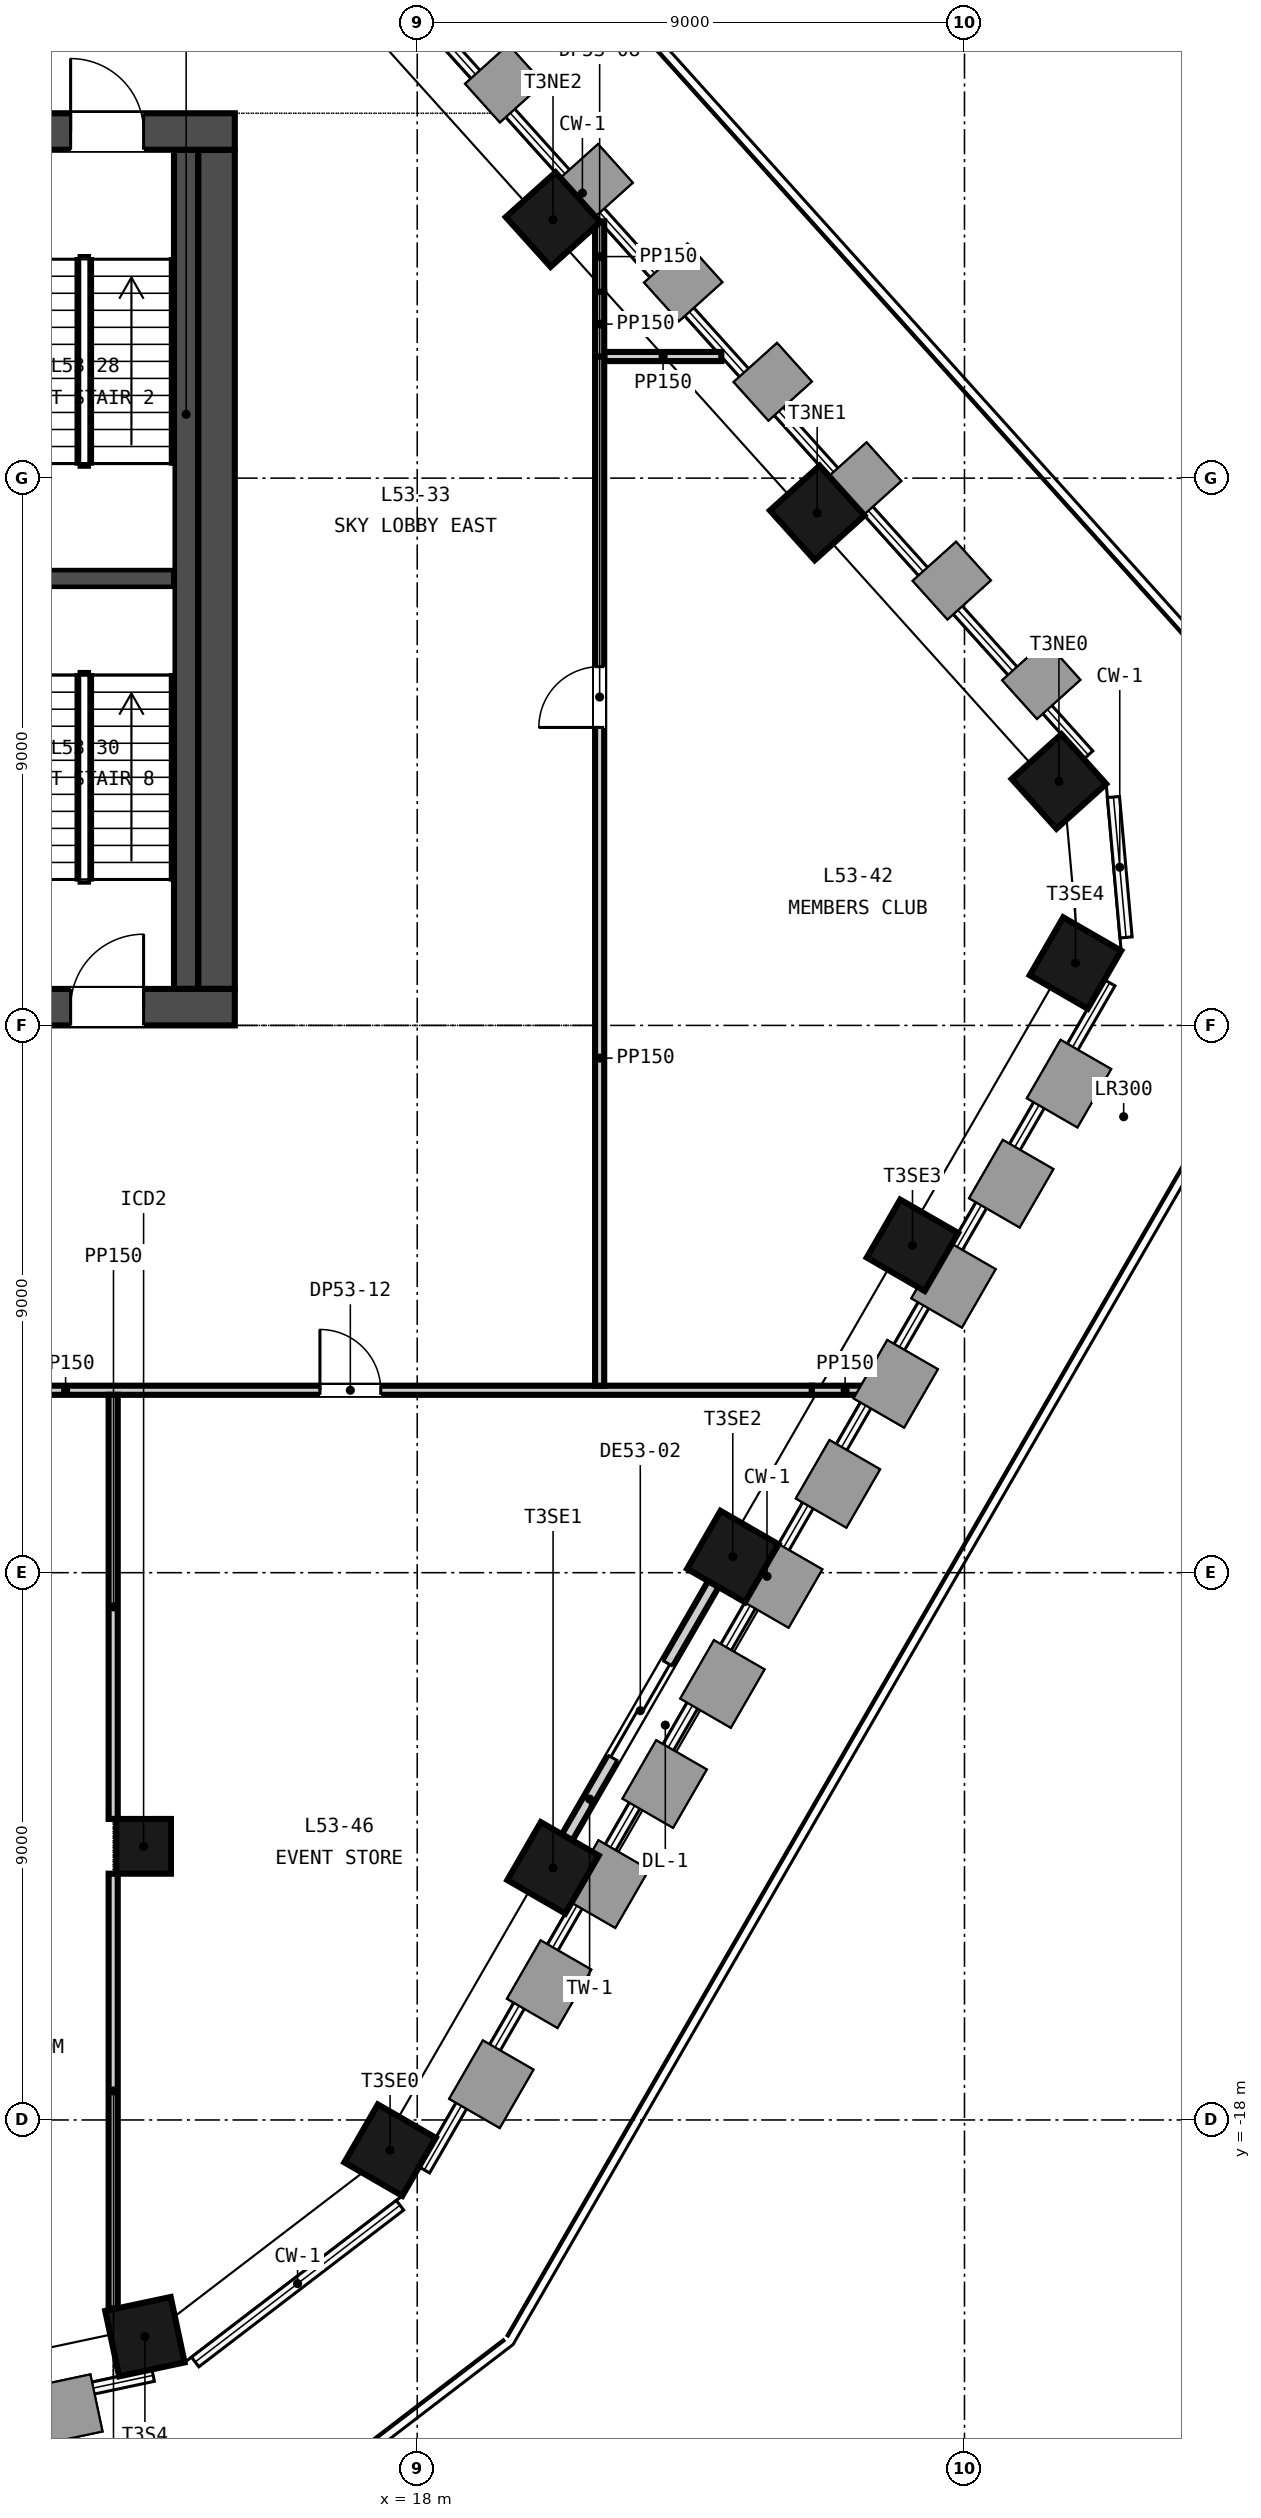
"""IFC4 building model, lengths in metres.
Left out: names, types, materials, properties, quantities, classifications, styles, units other than length and angle.
Written with IfcOpenShell. Run it as: python <this file> out.ifc"""

import sys

from ifc_helpers import new_model, si_unit, direction, frame, frame_2d, origin, origin_2d, place, context, subcontext, project, spatial, rectangle, extrude, element, fill, save


model = new_model("IFC4")
c1 = context("Model", 3, precision=1e-05, world=origin(), true_north=direction((0.0, 1.0)))
c2 = subcontext(c1, "Body", "Model", "MODEL_VIEW")
j1 = project(units=[si_unit("LENGTHUNIT", "METRE"), si_unit("PLANEANGLEUNIT", "RADIAN")], contexts=[c1])
p1 = place(None, origin())
s1 = spatial("IfcSite", under=j1, at=p1, CompositionType="ELEMENT")
p2 = place(p1, origin())
s2 = spatial("IfcBuilding", under=s1, at=p2, CompositionType="ELEMENT")
p3 = place(p2, frame((0.0, 0.0, 211.8)))
s3 = spatial("IfcBuildingStorey", under=s2, at=p3, CompositionType="ELEMENT", Elevation=211.8)
p4 = place(p3, frame((-15.0, 0.3, -0.3), z_axis=(0.0, 0.0, 1.0), x_axis=(1.0, 0.0, 0.0)))
e1 = element("IfcWall", 1, at=p4, inside=s3, PredefinedType="SOLIDWALL", context=c2, shape_type="SweptSolid", body=[
    extrude(rectangle(XDim=30.0, YDim=0.6, at=frame_2d((15.0, 0.0))), origin(), (0.0, 0.0, 1.0), 4.65),
])
p5 = place(p4, frame((5.8, 0.0, 0.3)))
e2 = element("IfcOpeningElement", 2, at=p5, cuts=e1, PredefinedType="OPENING", context=c2, shape_type="SweptSolid", body=[
    extrude(rectangle(XDim=2.4, YDim=2.4, at=frame_2d((1.2, 1.2))), frame((0.0, 0.31, 0.0), z_axis=(0.0, -1.0, 0.0), x_axis=(1.0, 0.0, 0.0)), (0.0, 0.0, 1.0), 0.62),
])
p6 = place(p4, frame((13.8, 0.0, 0.3)))
e3 = element("IfcOpeningElement", 3, at=p6, cuts=e1, PredefinedType="OPENING", context=c2, shape_type="SweptSolid", body=[
    extrude(rectangle(XDim=2.4, YDim=2.4, at=frame_2d((1.2, 1.2))), frame((0.0, 0.31, 0.0), z_axis=(0.0, -1.0, 0.0), x_axis=(1.0, 0.0, 0.0)), (0.0, 0.0, 1.0), 0.62),
])
p7 = place(p4, frame((21.8, 0.0, 0.3)))
e4 = element("IfcOpeningElement", 4, at=p7, cuts=e1, PredefinedType="OPENING", context=c2, shape_type="SweptSolid", body=[
    extrude(rectangle(XDim=2.4, YDim=2.4, at=frame_2d((1.2, 1.2))), frame((0.0, 0.31, 0.0), z_axis=(0.0, -1.0, 0.0), x_axis=(1.0, 0.0, 0.0)), (0.0, 0.0, 1.0), 0.62),
])
p8 = place(p4, frame((1.5, 0.0, 0.3)))
e5 = element("IfcOpeningElement", 5, at=p8, cuts=e1, PredefinedType="OPENING", context=c2, shape_type="SweptSolid", body=[
    extrude(rectangle(XDim=1.2, YDim=2.1, at=frame_2d((0.6, 1.05))), frame((0.0, 0.31, 0.0), z_axis=(0.0, -1.0, 0.0), x_axis=(1.0, 0.0, 0.0)), (0.0, 0.0, 1.0), 0.62),
])
p9 = place(p4, frame((27.3, 0.0, 0.3)))
e6 = element("IfcOpeningElement", 6, at=p9, cuts=e1, PredefinedType="OPENING", context=c2, shape_type="SweptSolid", body=[
    extrude(rectangle(XDim=1.2, YDim=2.1, at=frame_2d((0.6, 1.05))), frame((0.0, 0.31, 0.0), z_axis=(0.0, -1.0, 0.0), x_axis=(1.0, 0.0, 0.0)), (0.0, 0.0, 1.0), 0.62),
])
p10 = place(p3, frame((-15.0, 14.7, -0.3), z_axis=(0.0, 0.0, 1.0), x_axis=(1.0, 0.0, 0.0)))
e7 = element("IfcWall", 7, at=p10, inside=s3, PredefinedType="SOLIDWALL", context=c2, shape_type="SweptSolid", body=[
    extrude(rectangle(XDim=30.0, YDim=0.6, at=frame_2d((15.0, 0.0))), origin(), (0.0, 0.0, 1.0), 4.65),
])
p11 = place(p10, frame((9.25, 0.0, 0.3)))
e8 = element("IfcOpeningElement", 8, at=p11, cuts=e7, PredefinedType="OPENING", context=c2, shape_type="SweptSolid", body=[
    extrude(rectangle(XDim=1.5, YDim=2.1, at=frame_2d((0.75, 1.05))), frame((0.0, 0.31, 0.0), z_axis=(0.0, -1.0, 0.0), x_axis=(1.0, 0.0, 0.0)), (0.0, 0.0, 1.0), 0.62),
])
p12 = place(p10, frame((19.4, 0.0, 0.3)))
e9 = element("IfcOpeningElement", 9, at=p12, cuts=e7, PredefinedType="OPENING", context=c2, shape_type="SweptSolid", body=[
    extrude(rectangle(XDim=1.5, YDim=2.1, at=frame_2d((0.75, 1.05))), frame((0.0, 0.31, 0.0), z_axis=(0.0, -1.0, 0.0), x_axis=(1.0, 0.0, 0.0)), (0.0, 0.0, 1.0), 0.62),
])
p13 = place(p10, frame((1.5, 0.0, 0.3)))
e10 = element("IfcOpeningElement", 10, at=p13, cuts=e7, PredefinedType="OPENING", context=c2, shape_type="SweptSolid", body=[
    extrude(rectangle(XDim=1.2, YDim=2.1, at=frame_2d((0.6, 1.05))), frame((0.0, 0.31, 0.0), z_axis=(0.0, -1.0, 0.0), x_axis=(1.0, 0.0, 0.0)), (0.0, 0.0, 1.0), 0.62),
])
p14 = place(p10, frame((27.3, 0.0, 0.3)))
e11 = element("IfcOpeningElement", 11, at=p14, cuts=e7, PredefinedType="OPENING", context=c2, shape_type="SweptSolid", body=[
    extrude(rectangle(XDim=1.2, YDim=2.1, at=frame_2d((0.6, 1.05))), frame((0.0, 0.31, 0.0), z_axis=(0.0, -1.0, 0.0), x_axis=(1.0, 0.0, 0.0)), (0.0, 0.0, 1.0), 0.62),
])
p15 = place(p3, frame((14.7, 0.6, -0.3), z_axis=(0.0, 0.0, 1.0), x_axis=(0.0, 1.0, 0.0)))
e12 = element("IfcWall", 12, at=p15, inside=s3, PredefinedType="SOLIDWALL", context=c2, shape_type="SweptSolid", body=[
    extrude(rectangle(XDim=13.8, YDim=0.6, at=frame_2d((6.9, 0.0))), origin(), (0.0, 0.0, 1.0), 4.65),
])
for number, where, z_axis, x_axis in (
    (13, (13.522, -21.563, -0.3), (0.0, 0.0, 1.0), (0.978, 0.208, 0.0)),
    (14, (17.554, -18.496, -0.3), (0.0, 0.0, 1.0), (0.5, 0.866, 0.0)),
    (15, (20.234, -13.854, -0.3), (0.0, 0.0, 1.0), (0.5, 0.866, 0.0)),
    (16, (23.189, -8.735, -0.3), (0.0, 0.0, 1.0), (0.5, 0.866, 0.0)),
    (17, (26.145, -3.616, -0.3), (0.0, 0.0, 1.0), (0.5, 0.866, 0.0)),
    (18, (28.825, 1.026, -0.3), (0.0, 0.0, 1.0), (0.5, 0.866, 0.0)),
    (19, (28.553, 4.012, -0.3), (0.0, 0.0, 1.0), (-0.669, 0.743, 0.0)),
    (20, (24.577, 8.427, -0.3), (0.0, 0.0, 1.0), (-0.669, 0.743, 0.0)),
    (21, (20.233, 13.252, -0.3), (0.0, 0.0, 1.0), (-0.669, 0.743, 0.0)),
):
    element("IfcColumn", number, at=place(p3, frame(where, z_axis=z_axis, x_axis=x_axis)), inside=s3, PredefinedType="COLUMN", context=c2, shape_type="SweptSolid", body=[
        extrude(rectangle(XDim=1.1, YDim=1.1, at=origin_2d()), origin(), (0.0, 0.0, 1.0), 4.65),
    ])
p16 = place(p3, frame((13.5, -13.5, -0.3), z_axis=(0.0, 0.0, 1.0), x_axis=(1.0, 0.0, 0.0)))
e22 = element("IfcColumn", 22, at=p16, inside=s3, PredefinedType="COLUMN", context=c2, shape_type="SweptSolid", body=[
    extrude(rectangle(XDim=0.9, YDim=0.9, at=origin_2d()), origin(), (0.0, 0.0, 1.0), 4.65),
])
p17 = place(p3, frame((20.466, -13.352, 0.0), z_axis=(0.0, 0.0, 1.0), x_axis=(0.49998164095, 0.866036003127, 0.0)))
e23 = element("IfcWall", 23, at=p17, inside=s3, PredefinedType="SOLIDWALL", context=c2, shape_type="SweptSolid", body=[
    extrude(rectangle(XDim=4.811, YDim=0.2, at=frame_2d((2.405, 0.0))), origin(), (0.0, 0.0, 1.0), 3.7),
])
p18 = place(p17, frame((1.505, 0.0, 0.0)))
e24 = element("IfcOpeningElement", 24, at=p18, cuts=e23, PredefinedType="OPENING", context=c2, shape_type="SweptSolid", body=[
    extrude(rectangle(XDim=1.8, YDim=2.4, at=frame_2d((0.9, 1.2))), frame((0.0, 0.11, 0.0), z_axis=(0.0, -1.0, 0.0), x_axis=(1.0, 0.0, 0.0)), (0.0, 0.0, 1.0), 0.22),
])
p19 = place(p3, frame((11.05, 7.35, 0.0), z_axis=(0.0, 0.0, 1.0), x_axis=(1.0, 0.0, 0.0)))
e25 = element("IfcWall", 25, at=p19, inside=s3, PredefinedType="SOLIDWALL", context=c2, shape_type="SweptSolid", body=[
    extrude(rectangle(XDim=2.95, YDim=0.3, at=frame_2d((1.475, 0.0))), origin(), (0.0, 0.0, 1.0), 4.35),
])
p20 = place(p3, frame((14.2, 0.6, 0.0), z_axis=(0.0, 0.0, 1.0), x_axis=(0.0, 1.0, 0.0)))
e26 = element("IfcWall", 26, at=p20, inside=s3, PredefinedType="SOLIDWALL", context=c2, shape_type="SweptSolid", body=[
    extrude(rectangle(XDim=13.8, YDim=0.4, at=frame_2d((6.9, 0.0))), origin(), (0.0, 0.0, 1.0), 4.35),
])
p21 = place(p3, frame((8.075, -6.0, 0.0), z_axis=(0.0, 0.0, 1.0), x_axis=(1.0, 0.0, 0.0)))
e27 = element("IfcWall", 27, at=p21, inside=s3, PredefinedType="PARTITIONING", context=c2, shape_type="SweptSolid", body=[
    extrude(rectangle(XDim=16.415, YDim=0.15, at=frame_2d((8.208, 0.0))), origin(), (0.0, 0.0, 1.0), 4.35),
])
p22 = place(p21, frame((8.325, 0.0, 0.0)))
e28 = element("IfcOpeningElement", 28, at=p22, cuts=e27, PredefinedType="OPENING", context=c2, shape_type="SweptSolid", body=[
    extrude(rectangle(XDim=1.0, YDim=2.1, at=frame_2d((0.5, 1.05))), frame((0.0, 0.085, 0.0), z_axis=(0.0, -1.0, 0.0), x_axis=(1.0, 0.0, 0.0)), (0.0, 0.0, 1.0), 0.17),
])
p23 = place(p3, frame((24.49, -6.0, 0.0), z_axis=(0.0, 0.0, 1.0), x_axis=(1.0, 0.0, 0.0)))
e29 = element("IfcWall", 29, at=p23, inside=s3, PredefinedType="PARTITIONING", context=c2, shape_type="SweptSolid", body=[
    extrude(rectangle(XDim=1.083, YDim=0.15, at=frame_2d((0.542, 0.0))), origin(), (0.0, 0.0, 1.0), 3.7),
])
p24 = place(p3, frame((21.075, 11.0, 0.0), z_axis=(0.0, 0.0, 1.0), x_axis=(1.0, 0.0, 0.0)))
e30 = element("IfcWall", 30, at=p24, inside=s3, PredefinedType="PARTITIONING", context=c2, shape_type="SweptSolid", body=[
    extrude(rectangle(XDim=1.926, YDim=0.15, at=frame_2d((0.963, 0.0))), origin(), (0.0, 0.0, 1.0), 3.7),
])
p25 = place(p3, frame((13.0, -21.096, 0.0), z_axis=(0.0, 0.0, 1.0), x_axis=(0.0, 1.0, 0.0)))
e31 = element("IfcWall", 31, at=p25, inside=s3, PredefinedType="PARTITIONING", context=c2, shape_type="SweptSolid", body=[
    extrude(rectangle(XDim=7.146, YDim=0.15, at=frame_2d((3.573, 0.0))), origin(), (0.0, 0.0, 1.0), 4.35),
])
p26 = place(p3, frame((13.0, -13.05, 0.0), z_axis=(0.0, 0.0, 1.0), x_axis=(0.0, 1.0, 0.0)))
e32 = element("IfcWall", 32, at=p26, inside=s3, PredefinedType="PARTITIONING", context=c2, shape_type="SweptSolid", body=[
    extrude(rectangle(XDim=6.975, YDim=0.15, at=frame_2d((3.488, 0.0))), origin(), (0.0, 0.0, 1.0), 4.35),
])
p27 = place(p3, frame((21.0, -5.925, 0.0), z_axis=(0.0, 0.0, 1.0), x_axis=(0.0, 1.0, 0.0)))
e33 = element("IfcWall", 33, at=p27, inside=s3, PredefinedType="PARTITIONING", context=c2, shape_type="SweptSolid", body=[
    extrude(rectangle(XDim=16.925, YDim=0.15, at=frame_2d((8.462, 0.0))), origin(), (0.0, 0.0, 1.0), 4.35),
])
p28 = place(p27, frame((10.825, 0.0, 0.0)))
e34 = element("IfcOpeningElement", 34, at=p28, cuts=e33, PredefinedType="OPENING", context=c2, shape_type="SweptSolid", body=[
    extrude(rectangle(XDim=1.0, YDim=2.1, at=frame_2d((0.5, 1.05))), frame((0.0, 0.085, 0.0), z_axis=(0.0, -1.0, 0.0), x_axis=(1.0, 0.0, 0.0)), (0.0, 0.0, 1.0), 0.17),
])
p29 = place(p3, frame((21.0, 11.001, 0.0), z_axis=(0.0, 0.0, 1.0), x_axis=(0.0, 1.0, 0.0)))
e35 = element("IfcWall", 35, at=p29, inside=s3, PredefinedType="PARTITIONING", context=c2, shape_type="SweptSolid", body=[
    extrude(rectangle(XDim=1.063, YDim=0.15, at=frame_2d((0.532, 0.0))), origin(), (0.0, 0.0, 1.0), 4.35),
])
p30 = place(p3, frame((21.0, 12.064, 0.0), z_axis=(0.0, 0.0, 1.0), x_axis=(0.0, 1.0, 0.0)))
e36 = element("IfcWall", 36, at=p30, inside=s3, PredefinedType="PARTITIONING", context=c2, shape_type="SweptSolid", body=[
    extrude(rectangle(XDim=1.158, YDim=0.15, at=frame_2d((0.579, 0.0))), origin(), (0.0, 0.0, 1.0), 3.7),
])
p31 = place(p18, origin())
e37 = element("IfcDoor", 37, at=p31, inside=s3, OperationType="SINGLE_SWING_LEFT", PredefinedType="DOOR", context=c2, shape_type="SweptSolid", body=[
    extrude(rectangle(XDim=1.8, YDim=2.4, at=frame_2d((0.9, 1.2))), frame((0.0, 0.025, 0.0), z_axis=(0.0, -1.0, 0.0), x_axis=(1.0, 0.0, 0.0)), (0.0, 0.0, 1.0), 0.05),
])
fill(e24, e37)
p32 = place(p14, origin())
e38 = element("IfcDoor", 38, at=p32, inside=s3, OperationType="SINGLE_SWING_LEFT", PredefinedType="DOOR", context=c2, shape_type="SweptSolid", body=[
    extrude(rectangle(XDim=1.2, YDim=2.1, at=frame_2d((0.6, 1.05))), frame((0.0, 0.025, 0.0), z_axis=(0.0, -1.0, 0.0), x_axis=(1.0, 0.0, 0.0)), (0.0, 0.0, 1.0), 0.05),
])
fill(e11, e38)
p33 = place(p9, origin())
e39 = element("IfcDoor", 39, at=p33, inside=s3, OperationType="SINGLE_SWING_RIGHT", PredefinedType="DOOR", context=c2, shape_type="SweptSolid", body=[
    extrude(rectangle(XDim=1.2, YDim=2.1, at=frame_2d((0.6, 1.05))), frame((0.0, 0.025, 0.0), z_axis=(0.0, -1.0, 0.0), x_axis=(1.0, 0.0, 0.0)), (0.0, 0.0, 1.0), 0.05),
])
fill(e6, e39)
p34 = place(p28, origin())
e40 = element("IfcDoor", 40, at=p34, inside=s3, OperationType="SINGLE_SWING_LEFT", PredefinedType="DOOR", context=c2, shape_type="SweptSolid", body=[
    extrude(rectangle(XDim=1.0, YDim=2.1, at=frame_2d((0.5, 1.05))), frame((0.0, 0.025, 0.0), z_axis=(0.0, -1.0, 0.0), x_axis=(1.0, 0.0, 0.0)), (0.0, 0.0, 1.0), 0.05),
])
fill(e34, e40)
p35 = place(p22, origin())
e41 = element("IfcDoor", 41, at=p35, inside=s3, OperationType="SINGLE_SWING_LEFT", PredefinedType="DOOR", context=c2, shape_type="SweptSolid", body=[
    extrude(rectangle(XDim=1.0, YDim=2.1, at=frame_2d((0.5, 1.05))), frame((0.0, 0.025, 0.0), z_axis=(0.0, -1.0, 0.0), x_axis=(1.0, 0.0, 0.0)), (0.0, 0.0, 1.0), 0.05),
])
fill(e28, e41)
save(model, sys.argv[1])
